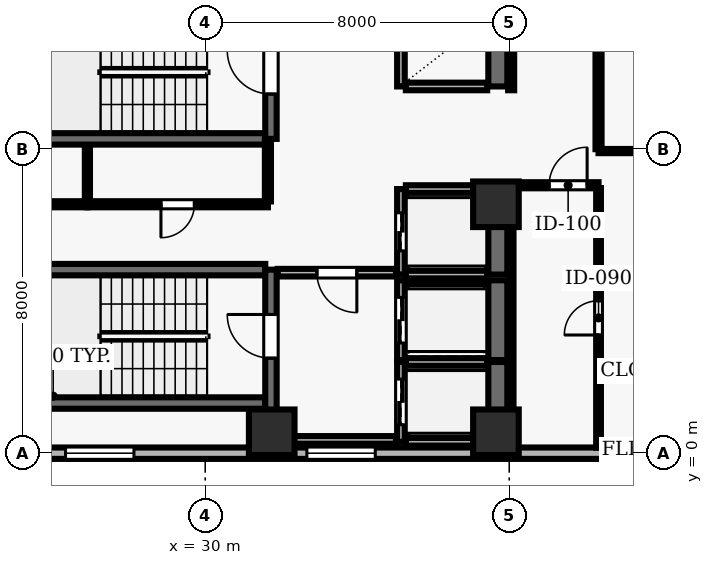
"""IFC4 building model, lengths in metres.
Left out: names, types, materials, properties, quantities, classifications, styles, units other than length and angle.
Written with IfcOpenShell. Run it as: python <this file> out.ifc"""

import sys

from ifc_helpers import new_model, si_unit, direction, frame, frame_2d, origin, origin_2d, place, context, subcontext, project, spatial, rectangle, extrude, element, fill, save


model = new_model("IFC4")
c1 = context("Model", 3, precision=1e-05, world=origin(), true_north=direction((0.0, 1.0)))
c2 = subcontext(c1, "Body", "Model", "MODEL_VIEW")
j1 = project(units=[si_unit("LENGTHUNIT", "METRE"), si_unit("PLANEANGLEUNIT", "RADIAN")], contexts=[c1])
p1 = place(None, origin())
s1 = spatial("IfcSite", under=j1, at=p1, CompositionType="ELEMENT")
p2 = place(p1, origin())
s2 = spatial("IfcBuilding", under=s1, at=p2, CompositionType="ELEMENT")
p3 = place(p2, frame((0.0, 0.0, 111.2)))
s3 = spatial("IfcBuildingStorey", under=s2, at=p3, CompositionType="ELEMENT", Elevation=111.2)
for number, where, z_axis, x_axis in (
    (1, (31.75, 0.55, 0.0), (0.0, 0.0, 1.0), (1.0, 0.0, 0.0)),
    (2, (37.65, 0.55, 0.0), (0.0, 0.0, 1.0), (1.0, 0.0, 0.0)),
    (3, (37.65, 6.55, 0.0), (0.0, 0.0, 1.0), (1.0, 0.0, 0.0)),
):
    element("IfcColumn", number, at=place(p3, frame(where, z_axis=z_axis, x_axis=x_axis)), inside=s3, PredefinedType="COLUMN", context=c2, shape_type="SweptSolid", body=[
        extrude(rectangle(XDim=1.2, YDim=1.2, at=origin_2d()), origin(), (0.0, 0.0, 1.0), 3.9),
    ])
p4 = place(p3, frame((24.5, 0.0, 0.0), z_axis=(0.0, 0.0, 1.0), x_axis=(1.0, 0.0, 0.0)))
e4 = element("IfcWall", 4, at=p4, inside=s3, PredefinedType="SOLIDWALL", context=c2, shape_type="SweptSolid", body=[
    extrude(rectangle(XDim=43.6, YDim=0.3, at=frame_2d((21.8, 0.0))), origin(), (0.0, 0.0, 1.0), 3.69),
])
p5 = place(p4, frame((1.825, 0.0, 0.9)))
e5 = element("IfcOpeningElement", 5, at=p5, cuts=e4, PredefinedType="OPENING", context=c2, shape_type="SweptSolid", body=[
    extrude(rectangle(XDim=1.8, YDim=1.6, at=frame_2d((0.9, 0.8))), frame((0.0, 0.16, 0.0), z_axis=(0.0, -1.0, 0.0), x_axis=(1.0, 0.0, 0.0)), (0.0, 0.0, 1.0), 0.32),
])
p6 = place(p4, frame((8.175, 0.0, 0.9)))
e6 = element("IfcOpeningElement", 6, at=p6, cuts=e4, PredefinedType="OPENING", context=c2, shape_type="SweptSolid", body=[
    extrude(rectangle(XDim=1.8, YDim=1.6, at=frame_2d((0.9, 0.8))), frame((0.0, 0.16, 0.0), z_axis=(0.0, -1.0, 0.0), x_axis=(1.0, 0.0, 0.0)), (0.0, 0.0, 1.0), 0.32),
])
p7 = place(p4, frame((18.175, 0.0, 0.9)))
e7 = element("IfcOpeningElement", 7, at=p7, cuts=e4, PredefinedType="OPENING", context=c2, shape_type="SweptSolid", body=[
    extrude(rectangle(XDim=1.8, YDim=1.6, at=frame_2d((0.9, 0.8))), frame((0.0, 0.16, 0.0), z_axis=(0.0, -1.0, 0.0), x_axis=(1.0, 0.0, 0.0)), (0.0, 0.0, 1.0), 0.32),
])
p8 = place(p4, frame((23.175, 0.0, 0.9)))
e8 = element("IfcOpeningElement", 8, at=p8, cuts=e4, PredefinedType="OPENING", context=c2, shape_type="SweptSolid", body=[
    extrude(rectangle(XDim=1.8, YDim=1.6, at=frame_2d((0.9, 0.8))), frame((0.0, 0.16, 0.0), z_axis=(0.0, -1.0, 0.0), x_axis=(1.0, 0.0, 0.0)), (0.0, 0.0, 1.0), 0.32),
])
p9 = place(p4, frame((29.075, 0.0, 0.9)))
e9 = element("IfcOpeningElement", 9, at=p9, cuts=e4, PredefinedType="OPENING", context=c2, shape_type="SweptSolid", body=[
    extrude(rectangle(XDim=1.8, YDim=1.6, at=frame_2d((0.9, 0.8))), frame((0.0, 0.16, 0.0), z_axis=(0.0, -1.0, 0.0), x_axis=(1.0, 0.0, 0.0)), (0.0, 0.0, 1.0), 0.32),
])
p10 = place(p4, frame((39.975, 0.0, 0.9)))
e10 = element("IfcOpeningElement", 10, at=p10, cuts=e4, PredefinedType="OPENING", context=c2, shape_type="SweptSolid", body=[
    extrude(rectangle(XDim=1.8, YDim=1.6, at=frame_2d((0.9, 0.8))), frame((0.0, 0.16, 0.0), z_axis=(0.0, -1.0, 0.0), x_axis=(1.0, 0.0, 0.0)), (0.0, 0.0, 1.0), 0.32),
])
for number, where, z_axis, x_axis in (
    (11, (31.58, 4.83, 0.0), (0.0, 0.0, 1.0), (-1.0, 0.0, 0.0)),
    (12, (23.22, 1.32, 0.0), (0.0, 0.0, 1.0), (1.0, 0.0, 0.0)),
):
    element("IfcWall", number, at=place(p3, frame(where, z_axis=z_axis, x_axis=x_axis)), inside=s3, PredefinedType="SHEAR", context=c2, shape_type="SweptSolid", body=[
        extrude(rectangle(XDim=8.36, YDim=0.3, at=frame_2d((4.18, 0.0))), origin(), (0.0, 0.0, 1.0), 3.69),
    ])
p11 = place(p3, frame((31.73, 0.96, 0.0), z_axis=(0.0, 0.0, 1.0), x_axis=(0.0, 1.0, 0.0)))
e13 = element("IfcWall", 13, at=p11, inside=s3, PredefinedType="SHEAR", context=c2, shape_type="SweptSolid", body=[
    extrude(rectangle(XDim=3.87, YDim=0.3, at=frame_2d((1.935, 0.0))), origin(), (0.0, 0.0, 1.0), 3.69),
])
p12 = place(p11, frame((1.54, 0.0, 0.0)))
e14 = element("IfcOpeningElement", 14, at=p12, cuts=e13, PredefinedType="OPENING", context=c2, shape_type="SweptSolid", body=[
    extrude(rectangle(XDim=1.15, YDim=2.15, at=frame_2d((0.575, 1.075))), frame((0.0, 0.16, 0.0), z_axis=(0.0, -1.0, 0.0), x_axis=(1.0, 0.0, 0.0)), (0.0, 0.0, 1.0), 0.32),
])
p13 = place(p3, frame((23.22, 8.27, 0.0), z_axis=(0.0, 0.0, 1.0), x_axis=(1.0, 0.0, 0.0)))
e15 = element("IfcWall", 15, at=p13, inside=s3, PredefinedType="SHEAR", context=c2, shape_type="SweptSolid", body=[
    extrude(rectangle(XDim=8.36, YDim=0.3, at=frame_2d((4.18, 0.0))), origin(), (0.0, 0.0, 1.0), 3.69),
])
p14 = place(p3, frame((31.73, 8.27, 0.0), z_axis=(0.0, 0.0, 1.0), x_axis=(0.0, 1.0, 0.0)))
e16 = element("IfcWall", 16, at=p14, inside=s3, PredefinedType="SHEAR", context=c2, shape_type="SweptSolid", body=[
    extrude(rectangle(XDim=3.51, YDim=0.3, at=frame_2d((1.755, 0.0))), origin(), (0.0, 0.0, 1.0), 3.69),
])
p15 = place(p14, frame((1.18, 0.0, 0.0)))
e17 = element("IfcOpeningElement", 17, at=p15, cuts=e16, PredefinedType="OPENING", context=c2, shape_type="SweptSolid", body=[
    extrude(rectangle(XDim=1.15, YDim=2.15, at=frame_2d((0.575, 1.075))), frame((0.0, 0.16, 0.0), z_axis=(0.0, -1.0, 0.0), x_axis=(1.0, 0.0, 0.0)), (0.0, 0.0, 1.0), 0.32),
])
p16 = place(p3, frame((35.15, 2.4, 0.0), z_axis=(0.0, 0.0, 1.0), x_axis=(0.0, -1.0, 0.0)))
e18 = element("IfcWall", 18, at=p16, inside=s3, PredefinedType="SOLIDWALL", context=c2, shape_type="SweptSolid", body=[
    extrude(rectangle(XDim=2.1, YDim=0.2, at=frame_2d((1.05, 0.0))), origin(), (0.0, 0.0, 1.0), 3.69),
])
p17 = place(p16, frame((0.45, 0.0, 0.0)))
e19 = element("IfcOpeningElement", 19, at=p17, cuts=e18, PredefinedType="OPENING", context=c2, shape_type="SweptSolid", body=[
    extrude(rectangle(XDim=1.2, YDim=2.15, at=frame_2d((0.6, 1.075))), frame((0.0, 0.11, 0.0), z_axis=(0.0, -1.0, 0.0), x_axis=(1.0, 0.0, 0.0)), (0.0, 0.0, 1.0), 0.22),
])
p18 = place(p3, frame((37.7, 0.3, 0.0), z_axis=(0.0, 0.0, 1.0), x_axis=(0.0, 1.0, 0.0)))
e20 = element("IfcWall", 20, at=p18, inside=s3, PredefinedType="SHEAR", context=c2, shape_type="SweptSolid", body=[
    extrude(rectangle(XDim=2.1, YDim=0.5, at=frame_2d((1.05, 0.0))), origin(), (0.0, 0.0, 1.0), 3.69),
])
for number, where, z_axis, x_axis in (
    (21, (35.28, 0.3, 0.0), (0.0, 0.0, 1.0), (1.0, 0.0, 0.0)),
    (22, (37.42, 2.4, 0.0), (0.0, 0.0, 1.0), (-1.0, 0.0, 0.0)),
):
    element("IfcWall", number, at=place(p3, frame(where, z_axis=z_axis, x_axis=x_axis)), inside=s3, PredefinedType="SOLIDWALL", context=c2, shape_type="SweptSolid", body=[
        extrude(rectangle(XDim=2.14, YDim=0.2, at=frame_2d((1.07, 0.0))), origin(), (0.0, 0.0, 1.0), 3.69),
    ])
p19 = place(p3, frame((35.15, 4.55, 0.0), z_axis=(0.0, 0.0, 1.0), x_axis=(0.0, -1.0, 0.0)))
e23 = element("IfcWall", 23, at=p19, inside=s3, PredefinedType="SOLIDWALL", context=c2, shape_type="SweptSolid", body=[
    extrude(rectangle(XDim=2.1, YDim=0.2, at=frame_2d((1.05, 0.0))), origin(), (0.0, 0.0, 1.0), 3.69),
])
p20 = place(p19, frame((0.45, 0.0, 0.0)))
e24 = element("IfcOpeningElement", 24, at=p20, cuts=e23, PredefinedType="OPENING", context=c2, shape_type="SweptSolid", body=[
    extrude(rectangle(XDim=1.2, YDim=2.15, at=frame_2d((0.6, 1.075))), frame((0.0, 0.11, 0.0), z_axis=(0.0, -1.0, 0.0), x_axis=(1.0, 0.0, 0.0)), (0.0, 0.0, 1.0), 0.22),
])
p21 = place(p3, frame((37.7, 2.45, 0.0), z_axis=(0.0, 0.0, 1.0), x_axis=(0.0, 1.0, 0.0)))
e25 = element("IfcWall", 25, at=p21, inside=s3, PredefinedType="SHEAR", context=c2, shape_type="SweptSolid", body=[
    extrude(rectangle(XDim=2.1, YDim=0.5, at=frame_2d((1.05, 0.0))), origin(), (0.0, 0.0, 1.0), 3.69),
])
p22 = place(p3, frame((37.42, 4.55, 0.0), z_axis=(0.0, 0.0, 1.0), x_axis=(-1.0, 0.0, 0.0)))
e26 = element("IfcWall", 26, at=p22, inside=s3, PredefinedType="SOLIDWALL", context=c2, shape_type="SweptSolid", body=[
    extrude(rectangle(XDim=2.14, YDim=0.2, at=frame_2d((1.07, 0.0))), origin(), (0.0, 0.0, 1.0), 3.69),
])
p23 = place(p3, frame((35.15, 6.95, 0.0), z_axis=(0.0, 0.0, 1.0), x_axis=(0.0, -1.0, 0.0)))
e27 = element("IfcWall", 27, at=p23, inside=s3, PredefinedType="SOLIDWALL", context=c2, shape_type="SweptSolid", body=[
    extrude(rectangle(XDim=2.25, YDim=0.2, at=frame_2d((1.125, 0.0))), origin(), (0.0, 0.0, 1.0), 3.69),
])
p24 = place(p23, frame((0.625, 0.0, 0.0)))
e28 = element("IfcOpeningElement", 28, at=p24, cuts=e27, PredefinedType="OPENING", context=c2, shape_type="SweptSolid", body=[
    extrude(rectangle(XDim=1.0, YDim=2.1, at=frame_2d((0.5, 1.05))), frame((0.0, 0.11, 0.0), z_axis=(0.0, -1.0, 0.0), x_axis=(1.0, 0.0, 0.0)), (0.0, 0.0, 1.0), 0.22),
])
p25 = place(p3, frame((37.7, 4.7, 0.0), z_axis=(0.0, 0.0, 1.0), x_axis=(0.0, 1.0, 0.0)))
e29 = element("IfcWall", 29, at=p25, inside=s3, PredefinedType="SHEAR", context=c2, shape_type="SweptSolid", body=[
    extrude(rectangle(XDim=2.25, YDim=0.5, at=frame_2d((1.125, 0.0))), origin(), (0.0, 0.0, 1.0), 3.69),
])
for number, where, z_axis, x_axis in (
    (30, (35.28, 4.7, 0.0), (0.0, 0.0, 1.0), (1.0, 0.0, 0.0)),
    (31, (37.42, 6.95, 0.0), (0.0, 0.0, 1.0), (-1.0, 0.0, 0.0)),
):
    element("IfcWall", number, at=place(p3, frame(where, z_axis=z_axis, x_axis=x_axis)), inside=s3, PredefinedType="SOLIDWALL", context=c2, shape_type="SweptSolid", body=[
        extrude(rectangle(XDim=2.14, YDim=0.2, at=frame_2d((1.07, 0.0))), origin(), (0.0, 0.0, 1.0), 3.69),
    ])
p26 = place(p3, frame((35.15, 11.55, 0.0), z_axis=(0.0, 0.0, 1.0), x_axis=(0.0, -1.0, 0.0)))
e32 = element("IfcWall", 32, at=p26, inside=s3, PredefinedType="SOLIDWALL", context=c2, shape_type="SweptSolid", body=[
    extrude(rectangle(XDim=1.9, YDim=0.2, at=frame_2d((0.95, 0.0))), origin(), (0.0, 0.0, 1.0), 3.69),
])
p27 = place(p3, frame((37.7, 9.65, 0.0), z_axis=(0.0, 0.0, 1.0), x_axis=(0.0, 1.0, 0.0)))
e33 = element("IfcWall", 33, at=p27, inside=s3, PredefinedType="SHEAR", context=c2, shape_type="SweptSolid", body=[
    extrude(rectangle(XDim=1.9, YDim=0.5, at=frame_2d((0.95, 0.0))), origin(), (0.0, 0.0, 1.0), 3.69),
])
p28 = place(p3, frame((35.28, 9.65, 0.0), z_axis=(0.0, 0.0, 1.0), x_axis=(1.0, 0.0, 0.0)))
e34 = element("IfcWall", 34, at=p28, inside=s3, PredefinedType="SOLIDWALL", context=c2, shape_type="SweptSolid", body=[
    extrude(rectangle(XDim=2.14, YDim=0.2, at=frame_2d((1.07, 0.0))), origin(), (0.0, 0.0, 1.0), 3.69),
])
p29 = place(p3, frame((26.9, 6.55, 0.0), z_axis=(0.0, 0.0, 1.0), x_axis=(-1.0, 0.0, 0.0)))
e35 = element("IfcWall", 35, at=p29, inside=s3, PredefinedType="PARTITIONING", context=c2, shape_type="SweptSolid", body=[
    extrude(rectangle(XDim=4.7, YDim=0.16, at=frame_2d((2.35, 0.0))), origin(), (0.0, 0.0, 1.0), 3.69),
])
p30 = place(p29, frame((1.91, 0.0, 0.0)))
e36 = element("IfcOpeningElement", 36, at=p30, cuts=e35, PredefinedType="OPENING", context=c2, shape_type="SweptSolid", body=[
    extrude(rectangle(XDim=0.88, YDim=2.1, at=frame_2d((0.44, 1.05))), frame((0.0, 0.09, 0.0), z_axis=(0.0, -1.0, 0.0), x_axis=(1.0, 0.0, 0.0)), (0.0, 0.0, 1.0), 0.18),
])
p31 = place(p3, frame((31.65, 0.35, 0.0), z_axis=(0.0, 0.0, 1.0), x_axis=(1.0, 0.0, 0.0)))
e37 = element("IfcWall", 37, at=p31, inside=s3, PredefinedType="SOLIDWALL", context=c2, shape_type="SweptSolid", body=[
    extrude(rectangle(XDim=3.37, YDim=0.2, at=frame_2d((1.685, 0.0))), origin(), (0.0, 0.0, 1.0), 3.69),
])
p32 = place(p3, frame((31.65, 6.55, 0.0), z_axis=(0.0, 0.0, 1.0), x_axis=(-1.0, 0.0, 0.0)))
e38 = element("IfcWall", 38, at=p32, inside=s3, PredefinedType="PARTITIONING", context=c2, shape_type="SweptSolid", body=[
    extrude(rectangle(XDim=4.75, YDim=0.16, at=frame_2d((2.375, 0.0))), origin(), (0.0, 0.0, 1.0), 3.69),
])
p33 = place(p32, frame((1.935, 0.0, 0.0)))
e39 = element("IfcOpeningElement", 39, at=p33, cuts=e38, PredefinedType="OPENING", context=c2, shape_type="SweptSolid", body=[
    extrude(rectangle(XDim=0.88, YDim=2.1, at=frame_2d((0.44, 1.05))), frame((0.0, 0.09, 0.0), z_axis=(0.0, -1.0, 0.0), x_axis=(1.0, 0.0, 0.0)), (0.0, 0.0, 1.0), 0.18),
])
p34 = place(p3, frame((35.02, 4.75, 0.0), z_axis=(0.0, 0.0, 1.0), x_axis=(-1.0, 0.0, 0.0)))
e40 = element("IfcWall", 40, at=p34, inside=s3, PredefinedType="SOLIDWALL", context=c2, shape_type="SweptSolid", body=[
    extrude(rectangle(XDim=3.11, YDim=0.2, at=frame_2d((1.555, 0.0))), origin(), (0.0, 0.0, 1.0), 3.69),
])
p35 = place(p34, frame((1.03, 0.0, 0.0)))
e41 = element("IfcOpeningElement", 41, at=p35, cuts=e40, PredefinedType="OPENING", context=c2, shape_type="SweptSolid", body=[
    extrude(rectangle(XDim=1.05, YDim=2.15, at=frame_2d((0.525, 1.075))), frame((0.0, 0.11, 0.0), z_axis=(0.0, -1.0, 0.0), x_axis=(1.0, 0.0, 0.0)), (0.0, 0.0, 1.0), 0.22),
])
p36 = place(p3, frame((38.05, 7.05, 0.0), z_axis=(0.0, 0.0, 1.0), x_axis=(1.0, 0.0, 0.0)))
e42 = element("IfcWall", 42, at=p36, inside=s3, PredefinedType="PARTITIONING", context=c2, shape_type="SweptSolid", body=[
    extrude(rectangle(XDim=2.3, YDim=0.16, at=frame_2d((1.15, 0.0))), origin(), (0.0, 0.0, 1.0), 3.69),
])
p37 = place(p36, frame((1.0, 0.0, 0.0)))
e43 = element("IfcOpeningElement", 43, at=p37, cuts=e42, PredefinedType="OPENING", context=c2, shape_type="SweptSolid", body=[
    extrude(rectangle(XDim=1.0, YDim=2.1, at=frame_2d((0.5, 1.05))), frame((0.0, 0.09, 0.0), z_axis=(0.0, -1.0, 0.0), x_axis=(1.0, 0.0, 0.0)), (0.0, 0.0, 1.0), 0.18),
])
p38 = place(p3, frame((50.33, 7.95, 0.0), z_axis=(0.0, 0.0, 1.0), x_axis=(-1.0, 0.0, 0.0)))
e44 = element("IfcWall", 44, at=p38, inside=s3, PredefinedType="MOVABLE", context=c2, shape_type="SweptSolid", body=[
    extrude(rectangle(XDim=9.98, YDim=0.11, at=frame_2d((4.99, 0.0))), origin(), (0.0, 0.0, 1.0), 3.074),
])
p39 = place(p3, frame((26.9, 6.625, 0.0), z_axis=(0.0, 0.0, 1.0), x_axis=(0.0, 1.0, 0.0)))
e45 = element("IfcWall", 45, at=p39, inside=s3, PredefinedType="PARTITIONING", context=c2, shape_type="SweptSolid", body=[
    extrude(rectangle(XDim=1.465, YDim=0.135, at=frame_2d((0.732, 0.0))), origin(), (0.0, 0.0, 1.0), 3.69),
])
p40 = place(p3, frame((31.65, 8.24, 0.0), z_axis=(0.0, 0.0, 1.0), x_axis=(0.0, -1.0, 0.0)))
e46 = element("IfcWall", 46, at=p40, inside=s3, PredefinedType="PARTITIONING", context=c2, shape_type="SweptSolid", body=[
    extrude(rectangle(XDim=1.615, YDim=0.16, at=frame_2d((0.808, 0.0))), origin(), (0.0, 0.0, 1.0), 3.69),
])
p41 = place(p3, frame((38.05, 6.975, 0.0), z_axis=(0.0, 0.0, 1.0), x_axis=(0.0, -1.0, 0.0)))
e47 = element("IfcWall", 47, at=p41, inside=s3, PredefinedType="PARTITIONING", context=c2, shape_type="SweptSolid", body=[
    extrude(rectangle(XDim=6.83, YDim=0.125, at=frame_2d((3.415, 0.0))), origin(), (0.0, 0.0, 1.0), 3.074),
])
p42 = place(p3, frame((38.05, 15.925, 0.0), z_axis=(0.0, 0.0, 1.0), x_axis=(0.0, -1.0, 0.0)))
e48 = element("IfcWall", 48, at=p42, inside=s3, PredefinedType="PARTITIONING", context=c2, shape_type="SweptSolid", body=[
    extrude(rectangle(XDim=6.375, YDim=0.16, at=frame_2d((3.188, 0.0))), origin(), (0.0, 0.0, 1.0), 3.074),
])
p43 = place(p3, frame((40.35, 0.145, 0.0), z_axis=(0.0, 0.0, 1.0), x_axis=(0.0, 1.0, 0.0)))
e49 = element("IfcWall", 49, at=p43, inside=s3, PredefinedType="PARTITIONING", context=c2, shape_type="SweptSolid", body=[
    extrude(rectangle(XDim=6.83, YDim=0.125, at=frame_2d((3.415, 0.0))), origin(), (0.0, 0.0, 1.0), 3.69),
])
p44 = place(p43, frame((2.965, 0.0, 0.0)))
e50 = element("IfcOpeningElement", 50, at=p44, cuts=e49, PredefinedType="OPENING", context=c2, shape_type="SweptSolid", body=[
    extrude(rectangle(XDim=0.9, YDim=2.1, at=frame_2d((0.45, 1.05))), frame((0.0, 0.073, 0.0), z_axis=(0.0, -1.0, 0.0), x_axis=(1.0, 0.0, 0.0)), (0.0, 0.0, 1.0), 0.145),
])
p45 = place(p3, frame((40.35, 8.0, 0.0), z_axis=(0.0, 0.0, 1.0), x_axis=(0.0, 1.0, 0.0)))
e51 = element("IfcWall", 51, at=p45, inside=s3, PredefinedType="PARTITIONING", context=c2, shape_type="SweptSolid", body=[
    extrude(rectangle(XDim=5.575, YDim=0.16, at=frame_2d((2.788, 0.0))), origin(), (0.0, 0.0, 1.0), 3.69),
])
p46 = place(p5, origin())
e52 = element("IfcWindow", 52, at=p46, inside=s3, PartitioningType="SINGLE_PANEL", PredefinedType="WINDOW", context=c2, shape_type="SweptSolid", body=[
    extrude(rectangle(XDim=1.8, YDim=1.6, at=frame_2d((0.9, 0.8))), frame((0.0, 0.03, 0.0), z_axis=(0.0, -1.0, 0.0), x_axis=(1.0, 0.0, 0.0)), (0.0, 0.0, 1.0), 0.06),
])
fill(e5, e52)
p47 = place(p6, origin())
e53 = element("IfcWindow", 53, at=p47, inside=s3, PartitioningType="SINGLE_PANEL", PredefinedType="WINDOW", context=c2, shape_type="SweptSolid", body=[
    extrude(rectangle(XDim=1.8, YDim=1.6, at=frame_2d((0.9, 0.8))), frame((0.0, 0.03, 0.0), z_axis=(0.0, -1.0, 0.0), x_axis=(1.0, 0.0, 0.0)), (0.0, 0.0, 1.0), 0.06),
])
fill(e6, e53)
p48 = place(p12, origin())
e54 = element("IfcDoor", 54, at=p48, inside=s3, OperationType="SINGLE_SWING_RIGHT", PredefinedType="DOOR", context=c2, shape_type="SweptSolid", body=[
    extrude(rectangle(XDim=1.15, YDim=2.15, at=frame_2d((0.575, 1.075))), frame((0.0, 0.025, 0.0), z_axis=(0.0, -1.0, 0.0), x_axis=(1.0, 0.0, 0.0)), (0.0, 0.0, 1.0), 0.05),
])
fill(e14, e54)
p49 = place(p15, origin())
e55 = element("IfcDoor", 55, at=p49, inside=s3, OperationType="SINGLE_SWING_RIGHT", PredefinedType="DOOR", context=c2, shape_type="SweptSolid", body=[
    extrude(rectangle(XDim=1.15, YDim=2.15, at=frame_2d((0.575, 1.075))), frame((0.0, 0.025, 0.0), z_axis=(0.0, -1.0, 0.0), x_axis=(1.0, 0.0, 0.0)), (0.0, 0.0, 1.0), 0.05),
])
fill(e17, e55)
p50 = place(p17, origin())
e56 = element("IfcDoor", 56, at=p50, inside=s3, OperationType="DOUBLE_DOOR_SLIDING", PredefinedType="DOOR", context=c2, shape_type="SweptSolid", body=[
    extrude(rectangle(XDim=1.2, YDim=2.15, at=frame_2d((0.6, 1.075))), frame((0.0, 0.025, 0.0), z_axis=(0.0, -1.0, 0.0), x_axis=(1.0, 0.0, 0.0)), (0.0, 0.0, 1.0), 0.05),
])
fill(e19, e56)
p51 = place(p20, origin())
e57 = element("IfcDoor", 57, at=p51, inside=s3, OperationType="DOUBLE_DOOR_SLIDING", PredefinedType="DOOR", context=c2, shape_type="SweptSolid", body=[
    extrude(rectangle(XDim=1.2, YDim=2.15, at=frame_2d((0.6, 1.075))), frame((0.0, 0.025, 0.0), z_axis=(0.0, -1.0, 0.0), x_axis=(1.0, 0.0, 0.0)), (0.0, 0.0, 1.0), 0.05),
])
fill(e24, e57)
p52 = place(p24, origin())
e58 = element("IfcDoor", 58, at=p52, inside=s3, OperationType="DOUBLE_DOOR_SLIDING", PredefinedType="DOOR", context=c2, shape_type="SweptSolid", body=[
    extrude(rectangle(XDim=1.0, YDim=2.1, at=frame_2d((0.5, 1.05))), frame((0.0, 0.025, 0.0), z_axis=(0.0, -1.0, 0.0), x_axis=(1.0, 0.0, 0.0)), (0.0, 0.0, 1.0), 0.05),
])
fill(e28, e58)
p53 = place(p35, origin())
e59 = element("IfcDoor", 59, at=p53, inside=s3, OperationType="SINGLE_SWING_LEFT", PredefinedType="DOOR", context=c2, shape_type="SweptSolid", body=[
    extrude(rectangle(XDim=1.05, YDim=2.15, at=frame_2d((0.525, 1.075))), frame((0.0, 0.025, 0.0), z_axis=(0.0, -1.0, 0.0), x_axis=(1.0, 0.0, 0.0)), (0.0, 0.0, 1.0), 0.05),
])
fill(e41, e59)
p54 = place(p33, origin())
e60 = element("IfcDoor", 60, at=p54, inside=s3, OperationType="SINGLE_SWING_RIGHT", PredefinedType="DOOR", context=c2, shape_type="SweptSolid", body=[
    extrude(rectangle(XDim=0.88, YDim=2.1, at=frame_2d((0.44, 1.05))), frame((0.0, 0.025, 0.0), z_axis=(0.0, -1.0, 0.0), x_axis=(1.0, 0.0, 0.0)), (0.0, 0.0, 1.0), 0.05),
])
fill(e39, e60)
p55 = place(p37, origin())
e61 = element("IfcDoor", 61, at=p55, inside=s3, OperationType="SINGLE_SWING_RIGHT", PredefinedType="DOOR", context=c2, shape_type="SweptSolid", body=[
    extrude(rectangle(XDim=1.0, YDim=2.1, at=frame_2d((0.5, 1.05))), frame((0.0, 0.025, 0.0), z_axis=(0.0, -1.0, 0.0), x_axis=(1.0, 0.0, 0.0)), (0.0, 0.0, 1.0), 0.05),
])
fill(e43, e61)
p56 = place(p44, origin())
e62 = element("IfcDoor", 62, at=p56, inside=s3, OperationType="SINGLE_SWING_LEFT", PredefinedType="DOOR", context=c2, shape_type="SweptSolid", body=[
    extrude(rectangle(XDim=0.9, YDim=2.1, at=frame_2d((0.45, 1.05))), frame((0.0, 0.025, 0.0), z_axis=(0.0, -1.0, 0.0), x_axis=(1.0, 0.0, 0.0)), (0.0, 0.0, 1.0), 0.05),
])
fill(e50, e62)
save(model, sys.argv[1])
